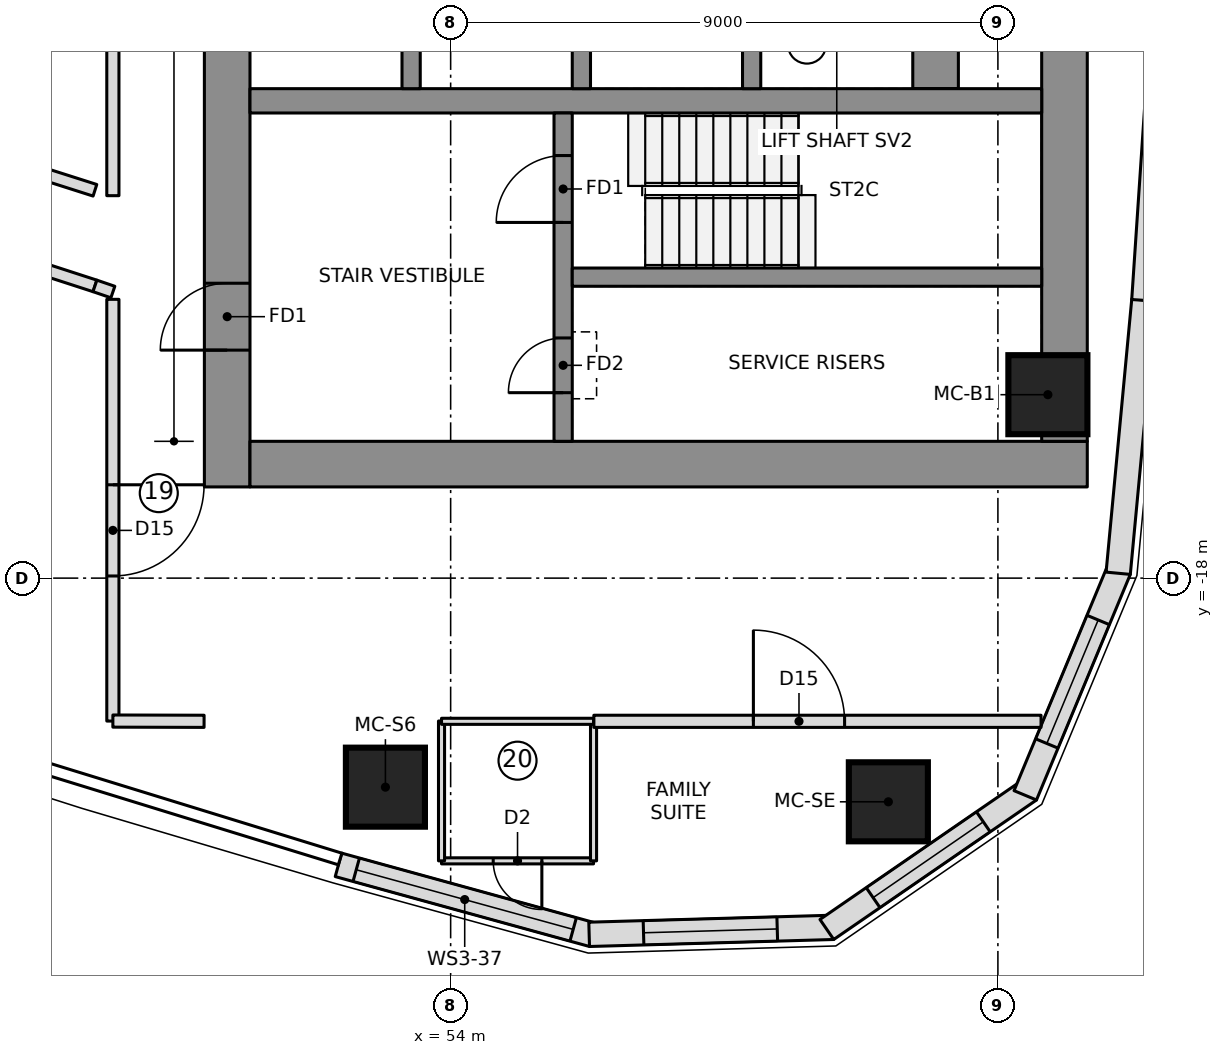
"""IFC4 building model, lengths in metres.
Left out: names, types, materials, properties, quantities, classifications, styles, units other than length and angle.
Written with IfcOpenShell. Run it as: python <this file> out.ifc"""

import sys

from ifc_helpers import new_model, si_unit, direction, frame, frame_2d, origin, origin_2d, place, context, subcontext, project, spatial, polyline, rectangle, outline, extrude, element, fill, save


model = new_model("IFC4")
c1 = context("Model", 3, precision=1e-05, world=origin(), true_north=direction((0.0, 1.0)))
c2 = subcontext(c1, "Body", "Model", "MODEL_VIEW")
j1 = project(units=[si_unit("LENGTHUNIT", "METRE"), si_unit("PLANEANGLEUNIT", "RADIAN")], contexts=[c1])
p1 = place(None, origin())
s1 = spatial("IfcSite", under=j1, at=p1, CompositionType="ELEMENT")
p2 = place(p1, origin())
s2 = spatial("IfcBuilding", under=s1, at=p2, CompositionType="ELEMENT")
p3 = place(p2, frame((0.0, 0.0, 189.7)))
s3 = spatial("IfcBuildingStorey", under=s2, at=p3, CompositionType="ELEMENT", Elevation=189.7)
p4 = place(p3, frame((50.325, -16.5, 0.0), z_axis=(0.0, 0.0, 1.0), x_axis=(0.0, 1.0, 0.0)))
e1 = element("IfcWall", 1, at=p4, inside=s3, PredefinedType="SHEAR", context=c2, shape_type="SweptSolid", body=[
    extrude(rectangle(XDim=9.85, YDim=0.75, at=frame_2d((4.925, 0.0))), origin(), (0.0, 0.0, 1.0), 3.55),
])
p5 = place(p4, frame((2.25, 0.0, 0.0)))
e2 = element("IfcOpeningElement", 2, at=p5, cuts=e1, PredefinedType="OPENING", context=c2, shape_type="SweptSolid", body=[
    extrude(rectangle(XDim=1.1, YDim=2.1, at=frame_2d((0.55, 1.05))), frame((0.0, 0.385, 0.0), z_axis=(0.0, -1.0, 0.0), x_axis=(1.0, 0.0, 0.0)), (0.0, 0.0, 1.0), 0.77),
])
p6 = place(p3, frame((50.7, -16.125, 0.0), z_axis=(0.0, 0.0, 1.0), x_axis=(1.0, 0.0, 0.0)))
e3 = element("IfcWall", 3, at=p6, inside=s3, PredefinedType="SHEAR", context=c2, shape_type="SweptSolid", body=[
    extrude(rectangle(XDim=13.77, YDim=0.75, at=frame_2d((6.885, 0.0))), origin(), (0.0, 0.0, 1.0), 3.55),
])
p7 = place(p3, frame((64.095, -15.75, 0.0), z_axis=(0.0, 0.0, 1.0), x_axis=(0.0, 1.0, 0.0)))
e4 = element("IfcWall", 4, at=p7, inside=s3, PredefinedType="SHEAR", context=c2, shape_type="SweptSolid", body=[
    extrude(rectangle(XDim=7.651, YDim=0.75, at=frame_2d((3.825, 0.0))), origin(), (0.0, 0.0, 1.0), 3.55),
])
p8 = place(p3, frame((61.975, -9.95, 0.0), z_axis=(0.0, 0.0, 1.0), x_axis=(0.0, 1.0, 0.0)))
e5 = element("IfcWall", 5, at=p8, inside=s3, PredefinedType="SHEAR", context=c2, shape_type="SweptSolid", body=[
    extrude(rectangle(XDim=19.9, YDim=0.75, at=frame_2d((9.95, 0.0))), origin(), (0.0, 0.0, 1.0), 3.55),
])
p9 = place(p3, frame((50.7, -10.15, 0.0), z_axis=(0.0, 0.0, 1.0), x_axis=(1.0, 0.0, 0.0)))
e6 = element("IfcWall", 6, at=p9, inside=s3, PredefinedType="SHEAR", context=c2, shape_type="SweptSolid", body=[
    extrude(rectangle(XDim=13.02, YDim=0.4, at=frame_2d((6.51, 0.0))), origin(), (0.0, 0.0, 1.0), 3.55),
])
for number, where, z_axis, x_axis in (
    (7, (53.35, -9.95, 0.0), (0.0, 0.0, 1.0), (0.0, 1.0, 0.0)),
    (8, (56.15, -9.95, 0.0), (0.0, 0.0, 1.0), (0.0, 1.0, 0.0)),
    (9, (58.95, -9.95, 0.0), (0.0, 0.0, 1.0), (0.0, 1.0, 0.0)),
):
    element("IfcWall", number, at=place(p3, frame(where, z_axis=z_axis, x_axis=x_axis)), inside=s3, PredefinedType="SHEAR", context=c2, shape_type="SweptSolid", body=[
        extrude(rectangle(XDim=3.0, YDim=0.3, at=frame_2d((1.5, 0.0))), origin(), (0.0, 0.0, 1.0), 3.55),
    ])
p10 = place(p3, frame((55.85, -15.75, 0.0), z_axis=(0.0, 0.0, 1.0), x_axis=(0.0, 1.0, 0.0)))
e10 = element("IfcWall", 10, at=p10, inside=s3, PredefinedType="SHEAR", context=c2, shape_type="SweptSolid", body=[
    extrude(rectangle(XDim=5.4, YDim=0.3, at=frame_2d((2.7, 0.0))), origin(), (0.0, 0.0, 1.0), 3.55),
])
p11 = place(p10, frame((3.6, 0.0, 0.0)))
e11 = element("IfcOpeningElement", 11, at=p11, cuts=e10, PredefinedType="OPENING", context=c2, shape_type="SweptSolid", body=[
    extrude(rectangle(XDim=1.1, YDim=2.1, at=frame_2d((0.55, 1.05))), frame((0.0, 0.16, 0.0), z_axis=(0.0, -1.0, 0.0), x_axis=(1.0, 0.0, 0.0)), (0.0, 0.0, 1.0), 0.32),
])
p12 = place(p10, frame((0.8, 0.0, 0.0)))
e12 = element("IfcOpeningElement", 12, at=p12, cuts=e10, PredefinedType="OPENING", context=c2, shape_type="SweptSolid", body=[
    extrude(rectangle(XDim=0.9, YDim=2.1, at=frame_2d((0.45, 1.05))), frame((0.0, 0.16, 0.0), z_axis=(0.0, -1.0, 0.0), x_axis=(1.0, 0.0, 0.0)), (0.0, 0.0, 1.0), 0.32),
])
p13 = place(p3, frame((56.0, -13.05, 0.0), z_axis=(0.0, 0.0, 1.0), x_axis=(1.0, 0.0, 0.0)))
e13 = element("IfcWall", 13, at=p13, inside=s3, PredefinedType="SHEAR", context=c2, shape_type="SweptSolid", body=[
    extrude(rectangle(XDim=7.72, YDim=0.3, at=frame_2d((3.86, 0.0))), origin(), (0.0, 0.0, 1.0), 3.55),
])
for number, where, z_axis, x_axis in (
    (14, (52.927, -21.438, 0.0), (0.0, 0.0, 1.0), (1.0, 0.0, 0.0)),
    (15, (61.198, -21.679, 0.0), (0.0, 0.0, 1.0), (1.0, 0.0, 0.0)),
    (16, (63.822, -14.983, 0.0), (0.0, 0.0, 1.0), (1.0, 0.0, 0.0)),
):
    element("IfcColumn", number, at=place(p3, frame(where, z_axis=z_axis, x_axis=x_axis)), inside=s3, PredefinedType="COLUMN", context=c2, shape_type="SweptSolid", body=[
        extrude(rectangle(XDim=1.3, YDim=1.3, at=origin_2d()), origin(), (0.0, 0.0, 1.0), 3.55),
    ])
p14 = place(p3, frame((52.155, -22.716, 0.0), z_axis=(0.0, 0.0, 1.0), x_axis=(0.964205755089, -0.265155165617, 0.0)))
e17 = element("IfcWall", 17, at=p14, inside=s3, PredefinedType="NOTDEFINED", context=c2, shape_type="SweptSolid", body=[
    extrude(outline(polyline([(0.0, -0.2), (4.337, -0.2), (4.277, 0.2), (0.0, 0.2), (0.0, -0.2)])), origin(), (0.0, 0.0, 1.0), 3.25),
])
p15 = place(p14, frame((0.303, 0.0, 0.9)))
e18 = element("IfcOpeningElement", 18, at=p15, cuts=e17, PredefinedType="OPENING", context=c2, shape_type="SweptSolid", body=[
    extrude(rectangle(XDim=3.7, YDim=1.8, at=frame_2d((1.85, 0.9))), frame((0.0, 0.21, 0.0), z_axis=(0.0, -1.0, 0.0), x_axis=(1.0, 0.0, 0.0)), (0.0, 0.0, 1.0), 0.42),
])
p16 = place(p3, frame((56.308, -23.858, 0.0), z_axis=(0.0, 0.0, 1.0), x_axis=(0.999587920197, 0.028705222472, 0.0)))
e19 = element("IfcWall", 19, at=p16, inside=s3, PredefinedType="NOTDEFINED", context=c2, shape_type="SweptSolid", body=[
    extrude(outline(polyline([(-0.03, -0.2), (3.989, -0.2), (3.87, 0.2), (0.03, 0.2), (-0.03, -0.2)])), origin(), (0.0, 0.0, 1.0), 3.25),
])
p17 = place(p16, frame((0.865, 0.0, 0.6)))
e20 = element("IfcOpeningElement", 20, at=p17, cuts=e19, PredefinedType="OPENING", context=c2, shape_type="SweptSolid", body=[
    extrude(outline(polyline([(0.0, 1.35), (0.084, 1.771), (0.322, 2.128), (0.679, 2.366), (1.1, 2.45), (1.521, 2.366), (1.878, 2.128), (2.116, 1.771), (2.2, 1.35), (2.2, 1.1), (2.116, 0.679), (1.878, 0.322), (1.521, 0.084), (1.1, 0.0), (0.679, 0.084), (0.322, 0.322), (0.084, 0.679), (0.0, 1.1), (0.0, 1.35)])), frame((0.0, 0.21, 0.0), z_axis=(0.0, -1.0, 0.0), x_axis=(1.0, 0.0, 0.0)), (0.0, 0.0, 1.0), 0.42),
])
p18 = place(p3, frame((60.236, -23.745, 0.0), z_axis=(0.0, 0.0, 1.0), x_axis=(0.823806162588, 0.566871596115, 0.0)))
e21 = element("IfcWall", 21, at=p18, inside=s3, PredefinedType="NOTDEFINED", context=c2, shape_type="SweptSolid", body=[
    extrude(outline(polyline([(-0.059, -0.2), (3.988, -0.2), (3.87, 0.2), (0.059, 0.2), (-0.059, -0.2)])), origin(), (0.0, 0.0, 1.0), 3.25),
])
p19 = place(p18, frame((0.865, 0.0, 0.6)))
e22 = element("IfcOpeningElement", 22, at=p19, cuts=e21, PredefinedType="OPENING", context=c2, shape_type="SweptSolid", body=[
    extrude(outline(polyline([(0.0, 1.35), (0.084, 1.771), (0.322, 2.128), (0.679, 2.366), (1.1, 2.45), (1.521, 2.366), (1.878, 2.128), (2.116, 1.771), (2.2, 1.35), (2.2, 1.1), (2.116, 0.679), (1.878, 0.322), (1.521, 0.084), (1.1, 0.0), (0.679, 0.084), (0.322, 0.322), (0.084, 0.679), (0.0, 1.1), (0.0, 1.35)])), frame((0.0, 0.21, 0.0), z_axis=(0.0, -1.0, 0.0), x_axis=(1.0, 0.0, 0.0)), (0.0, 0.0, 1.0), 0.42),
])
p20 = place(p3, frame((63.472, -21.518, 0.0), z_axis=(0.0, 0.0, 1.0), x_axis=(0.383997619794, 0.923334082547, 0.0)))
e23 = element("IfcWall", 23, at=p20, inside=s3, PredefinedType="NOTDEFINED", context=c2, shape_type="SweptSolid", body=[
    extrude(outline(polyline([(-0.059, -0.2), (3.959, -0.2), (3.899, 0.2), (0.059, 0.2), (-0.059, -0.2)])), origin(), (0.0, 0.0, 1.0), 3.25),
])
p21 = place(p20, frame((0.865, 0.0, 0.6)))
e24 = element("IfcOpeningElement", 24, at=p21, cuts=e23, PredefinedType="OPENING", context=c2, shape_type="SweptSolid", body=[
    extrude(outline(polyline([(0.0, 1.35), (0.084, 1.771), (0.322, 2.128), (0.679, 2.366), (1.1, 2.45), (1.521, 2.366), (1.878, 2.128), (2.116, 1.771), (2.2, 1.35), (2.2, 1.1), (2.116, 0.679), (1.878, 0.322), (1.521, 0.084), (1.1, 0.0), (0.679, 0.084), (0.322, 0.322), (0.084, 0.679), (0.0, 1.1), (0.0, 1.35)])), frame((0.0, 0.21, 0.0), z_axis=(0.0, -1.0, 0.0), x_axis=(1.0, 0.0, 0.0)), (0.0, 0.0, 1.0), 0.42),
])
p22 = place(p3, frame((64.981, -17.89, 0.0), z_axis=(0.0, 0.0, 1.0), x_axis=(0.093605694738, 0.995609348044, 0.0)))
e25 = element("IfcWall", 25, at=p22, inside=s3, PredefinedType="NOTDEFINED", context=c2, shape_type="SweptSolid", body=[
    extrude(outline(polyline([(-0.03, -0.2), (4.484, -0.2), (4.478, 0.2), (0.03, 0.2), (-0.03, -0.2)])), origin(), (0.0, 0.0, 1.0), 3.25),
])
p23 = place(p3, frame((65.401, -13.429, 0.0), z_axis=(0.0, 0.0, 1.0), x_axis=(0.066905935948, 0.997759287471, 0.0)))
e26 = element("IfcWall", 26, at=p23, inside=s3, PredefinedType="NOTDEFINED", context=c2, shape_type="SweptSolid", body=[
    extrude(outline(polyline([(-0.003, -0.2), (4.484, -0.2), (4.478, 0.2), (0.003, 0.2), (-0.003, -0.2)])), origin(), (0.0, 0.0, 1.0), 3.25),
])
p24 = place(p3, frame((56.35, -22.65, 0.0), z_axis=(0.0, 0.0, 1.0), x_axis=(-1.0, 0.0, 0.0)))
e27 = element("IfcWall", 27, at=p24, inside=s3, PredefinedType="PARTITIONING", context=c2, shape_type="SweptSolid", body=[
    extrude(rectangle(XDim=2.5, YDim=0.1, at=frame_2d((1.25, 0.0))), origin(), (0.0, 0.0, 1.0), 3.25),
])
p25 = place(p24, frame((0.85, 0.0, 0.0)))
e28 = element("IfcOpeningElement", 28, at=p25, cuts=e27, PredefinedType="OPENING", context=c2, shape_type="SweptSolid", body=[
    extrude(rectangle(XDim=0.8, YDim=2.1, at=frame_2d((0.4, 1.05))), frame((0.0, 0.06, 0.0), z_axis=(0.0, -1.0, 0.0), x_axis=(1.0, 0.0, 0.0)), (0.0, 0.0, 1.0), 0.12),
])
for number, where, z_axis, x_axis in (
    (29, (53.85, -22.65, 0.0), (0.0, 0.0, 1.0), (0.0, 1.0, 0.0)),
    (30, (56.35, -20.35, 0.0), (0.0, 0.0, 1.0), (0.0, -1.0, 0.0)),
):
    element("IfcWall", number, at=place(p3, frame(where, z_axis=z_axis, x_axis=x_axis)), inside=s3, PredefinedType="PARTITIONING", context=c2, shape_type="SweptSolid", body=[
        extrude(rectangle(XDim=2.3, YDim=0.1, at=frame_2d((1.15, 0.0))), origin(), (0.0, 0.0, 1.0), 3.25),
    ])
p26 = place(p3, frame((56.355, -20.355, 0.0), z_axis=(0.0, 0.0, 1.0), x_axis=(1.0, 0.0, 0.0)))
e31 = element("IfcWall", 31, at=p26, inside=s3, PredefinedType="PARTITIONING", context=c2, shape_type="SweptSolid", body=[
    extrude(rectangle(XDim=7.354, YDim=0.2, at=frame_2d((3.677, 0.0))), origin(), (0.0, 0.0, 1.0), 3.25),
])
p27 = place(p26, frame((2.624, 0.0, 0.0)))
e32 = element("IfcOpeningElement", 32, at=p27, cuts=e31, PredefinedType="OPENING", context=c2, shape_type="SweptSolid", body=[
    extrude(rectangle(XDim=1.5, YDim=2.1, at=frame_2d((0.75, 1.05))), frame((0.0, 0.11, 0.0), z_axis=(0.0, -1.0, 0.0), x_axis=(1.0, 0.0, 0.0)), (0.0, 0.0, 1.0), 0.22),
])
p28 = place(p3, frame((53.85, -20.355, 0.0), z_axis=(0.0, 0.0, 1.0), x_axis=(1.0, 0.0, 0.0)))
e33 = element("IfcWall", 33, at=p28, inside=s3, PredefinedType="PARTITIONING", context=c2, shape_type="SweptSolid", body=[
    extrude(rectangle(XDim=2.5, YDim=0.1, at=frame_2d((1.25, 0.0))), origin(), (0.0, 0.0, 1.0), 3.25),
])
p29 = place(p3, frame((44.49, -12.007, 0.0), z_axis=(0.0, 0.0, 1.0), x_axis=(0.951228355446, -0.308487626648, 0.0)))
e34 = element("IfcWall", 34, at=p29, inside=s3, PredefinedType="PARTITIONING", context=c2, shape_type="SweptSolid", body=[
    extrude(rectangle(XDim=3.847, YDim=0.2, at=frame_2d((1.924, 0.0))), origin(), (0.0, 0.0, 1.0), 3.25),
])
p30 = place(p3, frame((48.15, -11.621, 0.0), z_axis=(0.0, 0.0, 1.0), x_axis=(-0.952761948983, 0.303718074157, 0.0)))
e35 = element("IfcWall", 35, at=p30, inside=s3, PredefinedType="PARTITIONING", context=c2, shape_type="SweptSolid", body=[
    extrude(rectangle(XDim=1.332, YDim=0.2, at=frame_2d((0.666, 0.0))), origin(), (0.0, 0.0, 1.0), 3.25),
])
p31 = place(p3, frame((48.445, 11.71, 0.0), z_axis=(0.0, 0.0, 1.0), x_axis=(0.0, -1.0, 0.0)))
e36 = element("IfcWall", 36, at=p31, inside=s3, PredefinedType="PARTITIONING", context=c2, shape_type="SweptSolid", body=[
    extrude(rectangle(XDim=23.42, YDim=0.2, at=frame_2d((11.71, 0.0))), origin(), (0.0, 0.0, 1.0), 3.25),
])
p32 = place(p3, frame((48.15, -13.194, 0.0), z_axis=(0.0, 0.0, 1.0), x_axis=(0.946069343286, -0.323964191994, 0.0)))
e37 = element("IfcWall", 37, at=p32, inside=s3, PredefinedType="PARTITIONING", context=c2, shape_type="SweptSolid", body=[
    extrude(rectangle(XDim=0.312, YDim=0.2, at=frame_2d((0.156, 0.0))), origin(), (0.0, 0.0, 1.0), 3.25),
])
p33 = place(p3, frame((48.445, -13.415, 0.0), z_axis=(0.0, 0.0, 1.0), x_axis=(0.0, -1.0, 0.0)))
e38 = element("IfcWall", 38, at=p33, inside=s3, PredefinedType="PARTITIONING", context=c2, shape_type="SweptSolid", body=[
    extrude(rectangle(XDim=6.936, YDim=0.2, at=frame_2d((3.468, 0.0))), origin(), (0.0, 0.0, 1.0), 3.25),
])
p34 = place(p33, frame((3.05, 0.0, 0.0)))
e39 = element("IfcOpeningElement", 39, at=p34, cuts=e38, PredefinedType="OPENING", context=c2, shape_type="SweptSolid", body=[
    extrude(rectangle(XDim=1.5, YDim=2.1, at=frame_2d((0.75, 1.05))), frame((0.0, 0.11, 0.0), z_axis=(0.0, -1.0, 0.0), x_axis=(1.0, 0.0, 0.0)), (0.0, 0.0, 1.0), 0.22),
])
p35 = place(p3, frame((48.445, -20.351, 0.0), z_axis=(0.0, 0.0, 1.0), x_axis=(0.999996609175, -0.002604157836, 0.0)))
e40 = element("IfcWall", 40, at=p35, inside=s3, PredefinedType="PARTITIONING", context=c2, shape_type="SweptSolid", body=[
    extrude(rectangle(XDim=1.5, YDim=0.2, at=frame_2d((0.75, 0.0))), origin(), (0.0, 0.0, 1.0), 3.25),
])
p36 = place(p15, origin())
e41 = element("IfcWindow", 41, at=p36, inside=s3, PartitioningType="SINGLE_PANEL", PredefinedType="WINDOW", context=c2, shape_type="SweptSolid", body=[
    extrude(rectangle(XDim=3.7, YDim=1.8, at=frame_2d((1.85, 0.9))), frame((0.0, 0.17, 0.0), z_axis=(0.0, -1.0, 0.0), x_axis=(1.0, 0.0, 0.0)), (0.0, 0.0, 1.0), 0.06),
])
fill(e18, e41)
p37 = place(p17, origin())
e42 = element("IfcWindow", 42, at=p37, inside=s3, PartitioningType="SINGLE_PANEL", PredefinedType="WINDOW", context=c2, shape_type="SweptSolid", body=[
    extrude(outline(polyline([(0.0, 1.35), (0.084, 1.771), (0.322, 2.128), (0.679, 2.366), (1.1, 2.45), (1.521, 2.366), (1.878, 2.128), (2.116, 1.771), (2.2, 1.35), (2.2, 1.1), (2.116, 0.679), (1.878, 0.322), (1.521, 0.084), (1.1, 0.0), (0.679, 0.084), (0.322, 0.322), (0.084, 0.679), (0.0, 1.1), (0.0, 1.35)])), frame((0.0, 0.17, 0.0), z_axis=(0.0, -1.0, 0.0), x_axis=(1.0, 0.0, 0.0)), (0.0, 0.0, 1.0), 0.06),
])
fill(e20, e42)
p38 = place(p19, origin())
e43 = element("IfcWindow", 43, at=p38, inside=s3, PartitioningType="SINGLE_PANEL", PredefinedType="WINDOW", context=c2, shape_type="SweptSolid", body=[
    extrude(outline(polyline([(0.0, 1.35), (0.084, 1.771), (0.322, 2.128), (0.679, 2.366), (1.1, 2.45), (1.521, 2.366), (1.878, 2.128), (2.116, 1.771), (2.2, 1.35), (2.2, 1.1), (2.116, 0.679), (1.878, 0.322), (1.521, 0.084), (1.1, 0.0), (0.679, 0.084), (0.322, 0.322), (0.084, 0.679), (0.0, 1.1), (0.0, 1.35)])), frame((0.0, 0.17, 0.0), z_axis=(0.0, -1.0, 0.0), x_axis=(1.0, 0.0, 0.0)), (0.0, 0.0, 1.0), 0.06),
])
fill(e22, e43)
p39 = place(p21, origin())
e44 = element("IfcWindow", 44, at=p39, inside=s3, PartitioningType="SINGLE_PANEL", PredefinedType="WINDOW", context=c2, shape_type="SweptSolid", body=[
    extrude(outline(polyline([(0.0, 1.35), (0.084, 1.771), (0.322, 2.128), (0.679, 2.366), (1.1, 2.45), (1.521, 2.366), (1.878, 2.128), (2.116, 1.771), (2.2, 1.35), (2.2, 1.1), (2.116, 0.679), (1.878, 0.322), (1.521, 0.084), (1.1, 0.0), (0.679, 0.084), (0.322, 0.322), (0.084, 0.679), (0.0, 1.1), (0.0, 1.35)])), frame((0.0, 0.17, 0.0), z_axis=(0.0, -1.0, 0.0), x_axis=(1.0, 0.0, 0.0)), (0.0, 0.0, 1.0), 0.06),
])
fill(e24, e44)
p40 = place(p25, origin())
e45 = element("IfcDoor", 45, at=p40, inside=s3, OperationType="SINGLE_SWING_LEFT", PredefinedType="DOOR", context=c2, shape_type="SweptSolid", body=[
    extrude(rectangle(XDim=0.8, YDim=2.1, at=frame_2d((0.4, 1.05))), frame((0.0, 0.025, 0.0), z_axis=(0.0, -1.0, 0.0), x_axis=(1.0, 0.0, 0.0)), (0.0, 0.0, 1.0), 0.05),
])
fill(e28, e45)
p41 = place(p27, origin())
e46 = element("IfcDoor", 46, at=p41, inside=s3, OperationType="DOUBLE_DOOR_SINGLE_SWING", PredefinedType="DOOR", context=c2, shape_type="SweptSolid", body=[
    extrude(rectangle(XDim=1.5, YDim=2.1, at=frame_2d((0.75, 1.05))), frame((0.0, 0.025, 0.0), z_axis=(0.0, -1.0, 0.0), x_axis=(1.0, 0.0, 0.0)), (0.0, 0.0, 1.0), 0.05),
])
fill(e32, e46)
p42 = place(p34, origin())
e47 = element("IfcDoor", 47, at=p42, inside=s3, OperationType="DOUBLE_DOOR_SINGLE_SWING", PredefinedType="DOOR", context=c2, shape_type="SweptSolid", body=[
    extrude(rectangle(XDim=1.5, YDim=2.1, at=frame_2d((0.75, 1.05))), frame((0.0, 0.025, 0.0), z_axis=(0.0, -1.0, 0.0), x_axis=(1.0, 0.0, 0.0)), (0.0, 0.0, 1.0), 0.05),
])
fill(e39, e47)
p43 = place(p11, origin())
e48 = element("IfcDoor", 48, at=p43, inside=s3, OperationType="SINGLE_SWING_RIGHT", PredefinedType="DOOR", context=c2, shape_type="SweptSolid", body=[
    extrude(rectangle(XDim=1.1, YDim=2.1, at=frame_2d((0.55, 1.05))), frame((0.0, 0.025, 0.0), z_axis=(0.0, -1.0, 0.0), x_axis=(1.0, 0.0, 0.0)), (0.0, 0.0, 1.0), 0.05),
])
fill(e11, e48)
p44 = place(p5, origin())
e49 = element("IfcDoor", 49, at=p44, inside=s3, OperationType="SINGLE_SWING_RIGHT", PredefinedType="DOOR", context=c2, shape_type="SweptSolid", body=[
    extrude(rectangle(XDim=1.1, YDim=2.1, at=frame_2d((0.55, 1.05))), frame((0.0, 0.025, 0.0), z_axis=(0.0, -1.0, 0.0), x_axis=(1.0, 0.0, 0.0)), (0.0, 0.0, 1.0), 0.05),
])
fill(e2, e49)
p45 = place(p12, origin())
e50 = element("IfcDoor", 50, at=p45, inside=s3, OperationType="SINGLE_SWING_LEFT", PredefinedType="DOOR", context=c2, shape_type="SweptSolid", body=[
    extrude(rectangle(XDim=0.9, YDim=2.1, at=frame_2d((0.45, 1.05))), frame((0.0, 0.025, 0.0), z_axis=(0.0, -1.0, 0.0), x_axis=(1.0, 0.0, 0.0)), (0.0, 0.0, 1.0), 0.05),
])
fill(e12, e50)
save(model, sys.argv[1])
